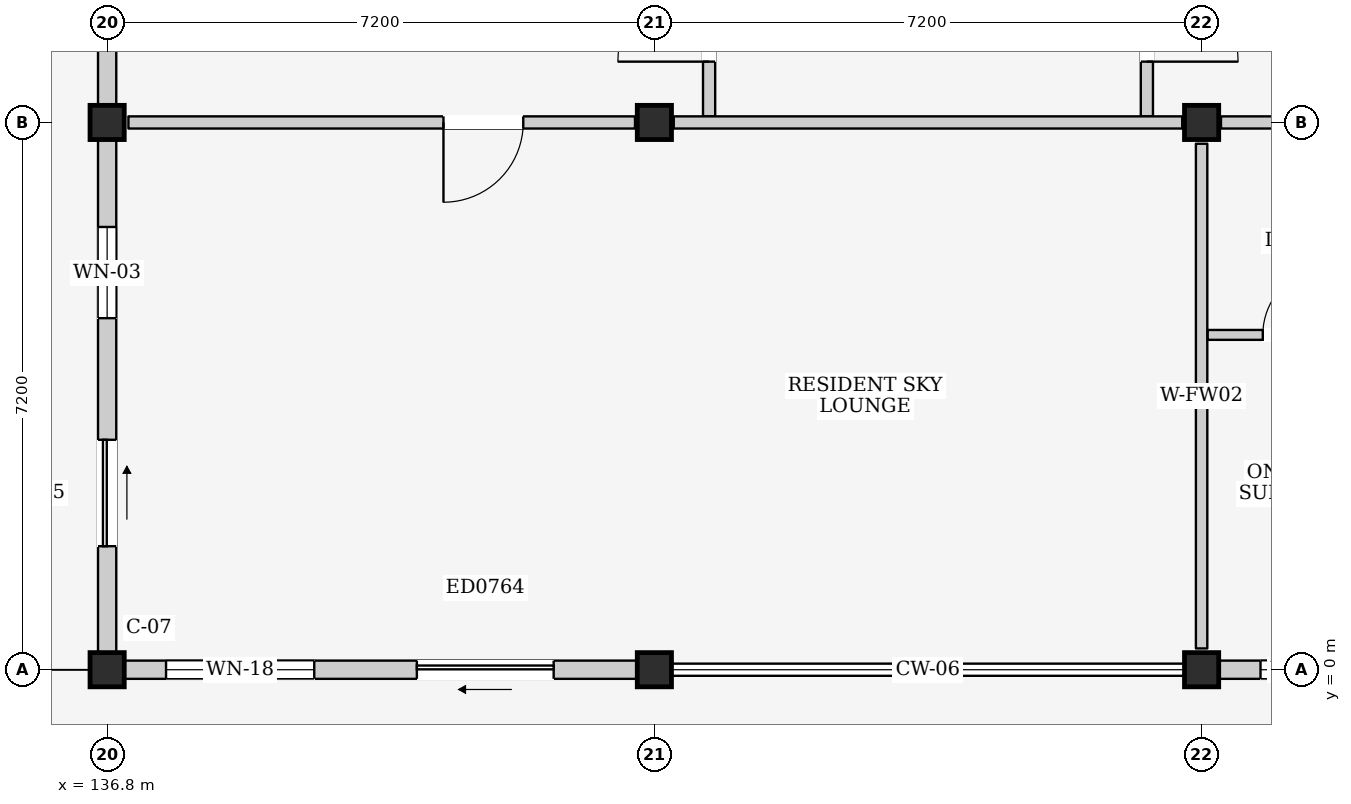
"""IFC4 building model, lengths in metres.
Left out: names, types, materials, properties, quantities, classifications, styles, units other than length and angle.
Written with IfcOpenShell. Run it as: python <this file> out.ifc"""

import sys

from ifc_helpers import new_model, si_unit, direction, frame, frame_2d, origin, origin_2d, place, context, subcontext, project, spatial, rectangle, extrude, element, fill, save


model = new_model("IFC4")
c1 = context("Model", 3, precision=1e-05, world=origin(), true_north=direction((0.0, 1.0)))
c2 = subcontext(c1, "Body", "Model", "MODEL_VIEW")
j1 = project(units=[si_unit("LENGTHUNIT", "METRE"), si_unit("PLANEANGLEUNIT", "RADIAN")], contexts=[c1])
p1 = place(None, origin())
s1 = spatial("IfcSite", under=j1, at=p1, CompositionType="ELEMENT")
p2 = place(p1, origin())
s2 = spatial("IfcBuilding", under=s1, at=p2, CompositionType="ELEMENT")
p3 = place(p2, frame((0.0, 0.0, 34.8)))
s3 = spatial("IfcBuildingStorey", under=s2, at=p3, CompositionType="ELEMENT", Elevation=34.8)
for number, where, z_axis, x_axis in (
    (1, (136.8, 0.0, 0.0), (0.0, 0.0, 1.0), (1.0, 0.0, 0.0)),
    (2, (136.8, 7.2, 0.0), (0.0, 0.0, 1.0), (1.0, 0.0, 0.0)),
    (3, (144.0, 0.0, 0.0), (0.0, 0.0, 1.0), (1.0, 0.0, 0.0)),
    (4, (144.0, 7.2, 0.0), (0.0, 0.0, 1.0), (1.0, 0.0, 0.0)),
    (5, (151.2, 0.0, 0.0), (0.0, 0.0, 1.0), (1.0, 0.0, 0.0)),
    (6, (151.2, 7.2, 0.0), (0.0, 0.0, 1.0), (1.0, 0.0, 0.0)),
):
    element("IfcColumn", number, at=place(p3, frame(where, z_axis=z_axis, x_axis=x_axis)), inside=s3, PredefinedType="COLUMN", context=c2, shape_type="SweptSolid", body=[
        extrude(rectangle(XDim=0.45, YDim=0.45, at=origin_2d()), origin(), (0.0, 0.0, 1.0), 3.2),
    ])
p4 = place(p3, frame((137.025, 0.0, 0.0), z_axis=(0.0, 0.0, 1.0), x_axis=(1.0, 0.0, 0.0)))
e7 = element("IfcWall", 7, at=p4, inside=s3, PredefinedType="ELEMENTEDWALL", context=c2, shape_type="SweptSolid", body=[
    extrude(rectangle(XDim=6.75, YDim=0.24, at=frame_2d((3.375, 0.0))), origin(), (0.0, 0.0, 1.0), 2.495),
])
p5 = place(p4, frame((3.85, 0.0, 0.0)))
e8 = element("IfcOpeningElement", 8, at=p5, cuts=e7, PredefinedType="OPENING", context=c2, shape_type="SweptSolid", body=[
    extrude(rectangle(XDim=1.8, YDim=2.12, at=frame_2d((0.9, 1.06))), frame((0.0, 0.135, 0.0), z_axis=(0.0, -1.0, 0.0), x_axis=(1.0, 0.0, 0.0)), (0.0, 0.0, 1.0), 0.27),
])
p6 = place(p4, frame((0.55, 0.0, 0.835)))
e9 = element("IfcOpeningElement", 9, at=p6, cuts=e7, PredefinedType="OPENING", context=c2, shape_type="SweptSolid", body=[
    extrude(rectangle(XDim=1.95, YDim=1.55, at=frame_2d((0.975, 0.775))), frame((0.0, 0.135, 0.0), z_axis=(0.0, -1.0, 0.0), x_axis=(1.0, 0.0, 0.0)), (0.0, 0.0, 1.0), 0.27),
])
p7 = place(p3, frame((136.8, 0.225, 0.0), z_axis=(0.0, 0.0, 1.0), x_axis=(0.0, 1.0, 0.0)))
e10 = element("IfcWall", 10, at=p7, inside=s3, PredefinedType="ELEMENTEDWALL", context=c2, shape_type="SweptSolid", body=[
    extrude(rectangle(XDim=6.75, YDim=0.24, at=frame_2d((3.375, 0.0))), origin(), (0.0, 0.0, 1.0), 2.445),
])
p8 = place(p7, frame((1.4, 0.0, 0.0)))
e11 = element("IfcOpeningElement", 11, at=p8, cuts=e10, PredefinedType="OPENING", context=c2, shape_type="SweptSolid", body=[
    extrude(rectangle(XDim=1.4, YDim=2.1, at=frame_2d((0.7, 1.05))), frame((0.0, 0.135, 0.0), z_axis=(0.0, -1.0, 0.0), x_axis=(1.0, 0.0, 0.0)), (0.0, 0.0, 1.0), 0.27),
])
p9 = place(p7, frame((4.4, 0.0, 0.95)))
e12 = element("IfcOpeningElement", 12, at=p9, cuts=e10, PredefinedType="OPENING", context=c2, shape_type="SweptSolid", body=[
    extrude(rectangle(XDim=1.2, YDim=1.35, at=frame_2d((0.6, 0.675))), frame((0.0, 0.135, 0.0), z_axis=(0.0, -1.0, 0.0), x_axis=(1.0, 0.0, 0.0)), (0.0, 0.0, 1.0), 0.27),
])
p10 = place(p3, frame((136.8, 7.425, 0.0), z_axis=(0.0, 0.0, 1.0), x_axis=(0.0, 1.0, 0.0)))
e13 = element("IfcWall", 13, at=p10, inside=s3, PredefinedType="ELEMENTEDWALL", context=c2, shape_type="SweptSolid", body=[
    extrude(rectangle(XDim=6.75, YDim=0.24, at=frame_2d((3.375, 0.0))), origin(), (0.0, 0.0, 1.0), 2.445),
])
p11 = place(p10, frame((4.3, 0.0, 1.2)))
e14 = element("IfcOpeningElement", 14, at=p11, cuts=e13, PredefinedType="OPENING", context=c2, shape_type="SweptSolid", body=[
    extrude(rectangle(XDim=1.0, YDim=0.9, at=frame_2d((0.5, 0.45))), frame((0.0, 0.135, 0.0), z_axis=(0.0, -1.0, 0.0), x_axis=(1.0, 0.0, 0.0)), (0.0, 0.0, 1.0), 0.27),
])
p12 = place(p3, frame((151.425, 0.0, 0.0), z_axis=(0.0, 0.0, 1.0), x_axis=(1.0, 0.0, 0.0)))
e15 = element("IfcWall", 15, at=p12, inside=s3, PredefinedType="ELEMENTEDWALL", context=c2, shape_type="SweptSolid", body=[
    extrude(rectangle(XDim=6.75, YDim=0.24, at=frame_2d((3.375, 0.0))), origin(), (0.0, 0.0, 1.0), 2.495),
])
p13 = place(p12, frame((3.85, 0.0, 0.0)))
e16 = element("IfcOpeningElement", 16, at=p13, cuts=e15, PredefinedType="OPENING", context=c2, shape_type="SweptSolid", body=[
    extrude(rectangle(XDim=1.5, YDim=2.12, at=frame_2d((0.75, 1.06))), frame((0.0, 0.135, 0.0), z_axis=(0.0, -1.0, 0.0), x_axis=(1.0, 0.0, 0.0)), (0.0, 0.0, 1.0), 0.27),
])
p14 = place(p12, frame((0.55, 0.0, 0.9)))
e17 = element("IfcOpeningElement", 17, at=p14, cuts=e15, PredefinedType="OPENING", context=c2, shape_type="SweptSolid", body=[
    extrude(rectangle(XDim=1.15, YDim=1.15, at=frame_2d((0.575, 0.575))), frame((0.0, 0.135, 0.0), z_axis=(0.0, -1.0, 0.0), x_axis=(1.0, 0.0, 0.0)), (0.0, 0.0, 1.0), 0.27),
])
p15 = place(p3, frame((144.72, 7.28, 0.0), z_axis=(0.0, 0.0, 1.0), x_axis=(0.0, 1.0, 0.0)))
e18 = element("IfcWall", 18, at=p15, inside=s3, PredefinedType="PARTITIONING", context=c2, shape_type="SweptSolid", body=[
    extrude(rectangle(XDim=4.32, YDim=0.16, at=frame_2d((2.16, 0.0))), origin(), (0.0, 0.0, 1.0), 2.96),
])
p16 = place(p15, frame((0.72, 0.0, 0.0)))
e19 = element("IfcOpeningElement", 19, at=p16, cuts=e18, PredefinedType="OPENING", context=c2, shape_type="SweptSolid", body=[
    extrude(rectangle(XDim=1.2, YDim=2.2, at=frame_2d((0.6, 1.1))), frame((0.0, 0.095, 0.0), z_axis=(0.0, -1.0, 0.0), x_axis=(1.0, 0.0, 0.0)), (0.0, 0.0, 1.0), 0.19),
])
p17 = place(p3, frame((150.48, 7.28, 0.0), z_axis=(0.0, 0.0, 1.0), x_axis=(0.0, 1.0, 0.0)))
e20 = element("IfcWall", 20, at=p17, inside=s3, PredefinedType="PARTITIONING", context=c2, shape_type="SweptSolid", body=[
    extrude(rectangle(XDim=4.32, YDim=0.16, at=frame_2d((2.16, 0.0))), origin(), (0.0, 0.0, 1.0), 2.96),
])
p18 = place(p17, frame((0.72, 0.0, 0.0)))
e21 = element("IfcOpeningElement", 21, at=p18, cuts=e20, PredefinedType="OPENING", context=c2, shape_type="SweptSolid", body=[
    extrude(rectangle(XDim=1.2, YDim=2.2, at=frame_2d((0.6, 1.1))), frame((0.0, 0.095, 0.0), z_axis=(0.0, -1.0, 0.0), x_axis=(1.0, 0.0, 0.0)), (0.0, 0.0, 1.0), 0.19),
])
p19 = place(p3, frame((137.08, 7.2, 0.0), z_axis=(0.0, 0.0, 1.0), x_axis=(1.0, 0.0, 0.0)))
e22 = element("IfcWall", 22, at=p19, inside=s3, PredefinedType="PARTITIONING", context=c2, shape_type="SweptSolid", body=[
    extrude(rectangle(XDim=6.665, YDim=0.16, at=frame_2d((3.333, 0.0))), origin(), (0.0, 0.0, 1.0), 2.345),
])
p20 = place(p19, frame((4.145, 0.0, 0.0)))
e23 = element("IfcOpeningElement", 23, at=p20, cuts=e22, PredefinedType="OPENING", context=c2, shape_type="SweptSolid", body=[
    extrude(rectangle(XDim=1.05, YDim=2.2, at=frame_2d((0.525, 1.1))), frame((0.0, 0.095, 0.0), z_axis=(0.0, -1.0, 0.0), x_axis=(1.0, 0.0, 0.0)), (0.0, 0.0, 1.0), 0.19),
])
p21 = place(p3, frame((144.255, 7.2, 0.0), z_axis=(0.0, 0.0, 1.0), x_axis=(1.0, 0.0, 0.0)))
e24 = element("IfcWall", 24, at=p21, inside=s3, PredefinedType="PARTITIONING", context=c2, shape_type="SweptSolid", body=[
    extrude(rectangle(XDim=6.69, YDim=0.16, at=frame_2d((3.345, 0.0))), origin(), (0.0, 0.0, 1.0), 2.345),
])
p22 = place(p3, frame((151.2, 0.28, 0.0), z_axis=(0.0, 0.0, 1.0), x_axis=(0.0, 1.0, 0.0)))
e25 = element("IfcWall", 25, at=p22, inside=s3, PredefinedType="PARTITIONING", context=c2, shape_type="SweptSolid", body=[
    extrude(rectangle(XDim=6.64, YDim=0.15, at=frame_2d((3.32, 0.0))), origin(), (0.0, 0.0, 1.0), 2.445),
])
p23 = place(p3, frame((151.455, 7.2, 0.0), z_axis=(0.0, 0.0, 1.0), x_axis=(1.0, 0.0, 0.0)))
e26 = element("IfcWall", 26, at=p23, inside=s3, PredefinedType="PARTITIONING", context=c2, shape_type="SweptSolid", body=[
    extrude(rectangle(XDim=6.69, YDim=0.16, at=frame_2d((3.345, 0.0))), origin(), (0.0, 0.0, 1.0), 2.345),
])
p24 = place(p23, frame((4.895, 0.0, 0.0)))
e27 = element("IfcOpeningElement", 27, at=p24, cuts=e26, PredefinedType="OPENING", context=c2, shape_type="SweptSolid", body=[
    extrude(rectangle(XDim=1.0, YDim=2.15, at=frame_2d((0.5, 1.075))), frame((0.0, 0.095, 0.0), z_axis=(0.0, -1.0, 0.0), x_axis=(1.0, 0.0, 0.0)), (0.0, 0.0, 1.0), 0.19),
])
p25 = place(p3, frame((151.28, 4.405, 0.0), z_axis=(0.0, 0.0, 1.0), x_axis=(1.0, 0.0, 0.0)))
e28 = element("IfcWall", 28, at=p25, inside=s3, PredefinedType="PARTITIONING", context=c2, shape_type="SweptSolid", body=[
    extrude(rectangle(XDim=2.35, YDim=0.13, at=frame_2d((1.175, 0.0))), origin(), (0.0, 0.0, 1.0), 2.96),
])
p26 = place(p25, frame((0.725, 0.0, 0.0)))
e29 = element("IfcOpeningElement", 29, at=p26, cuts=e28, PredefinedType="OPENING", context=c2, shape_type="SweptSolid", body=[
    extrude(rectangle(XDim=0.9, YDim=2.1, at=frame_2d((0.45, 1.05))), frame((0.0, 0.08, 0.0), z_axis=(0.0, -1.0, 0.0), x_axis=(1.0, 0.0, 0.0)), (0.0, 0.0, 1.0), 0.16),
])
p27 = place(p5, frame((1.8, 0.0, 0.0), z_axis=(0.0, 0.0, 1.0), x_axis=(-1.0, 0.0, 0.0)))
e30 = element("IfcDoor", 30, at=p27, inside=s3, OperationType="SLIDING_TO_LEFT", PredefinedType="DOOR", context=c2, shape_type="SweptSolid", body=[
    extrude(rectangle(XDim=1.8, YDim=2.12, at=frame_2d((0.9, 1.06))), frame((0.0, 0.025, 0.0), z_axis=(0.0, -1.0, 0.0), x_axis=(1.0, 0.0, 0.0)), (0.0, 0.0, 1.0), 0.05),
])
fill(e8, e30)
p28 = place(p6, origin())
e31 = element("IfcWindow", 31, at=p28, inside=s3, PartitioningType="DOUBLE_PANEL_VERTICAL", PredefinedType="WINDOW", context=c2, shape_type="SweptSolid", body=[
    extrude(rectangle(XDim=1.95, YDim=1.55, at=frame_2d((0.975, 0.775))), frame((0.0, 0.03, 0.0), z_axis=(0.0, -1.0, 0.0), x_axis=(1.0, 0.0, 0.0)), (0.0, 0.0, 1.0), 0.06),
])
fill(e9, e31)
p29 = place(p8, frame((1.4, 0.0, 0.0), z_axis=(0.0, 0.0, 1.0), x_axis=(-1.0, 0.0, 0.0)))
e32 = element("IfcDoor", 32, at=p29, inside=s3, OperationType="SLIDING_TO_RIGHT", PredefinedType="DOOR", context=c2, shape_type="SweptSolid", body=[
    extrude(rectangle(XDim=1.4, YDim=2.1, at=frame_2d((0.7, 1.05))), frame((0.0, 0.025, 0.0), z_axis=(0.0, -1.0, 0.0), x_axis=(1.0, 0.0, 0.0)), (0.0, 0.0, 1.0), 0.05),
])
fill(e11, e32)
p30 = place(p9, origin())
e33 = element("IfcWindow", 33, at=p30, inside=s3, PartitioningType="SINGLE_PANEL", PredefinedType="WINDOW", context=c2, shape_type="SweptSolid", body=[
    extrude(rectangle(XDim=1.2, YDim=1.35, at=frame_2d((0.6, 0.675))), frame((0.0, 0.03, 0.0), z_axis=(0.0, -1.0, 0.0), x_axis=(1.0, 0.0, 0.0)), (0.0, 0.0, 1.0), 0.06),
])
fill(e12, e33)
p31 = place(p14, origin())
e34 = element("IfcWindow", 34, at=p31, inside=s3, PartitioningType="SINGLE_PANEL", PredefinedType="WINDOW", context=c2, shape_type="SweptSolid", body=[
    extrude(rectangle(XDim=1.15, YDim=1.15, at=frame_2d((0.575, 0.575))), frame((0.0, 0.03, 0.0), z_axis=(0.0, -1.0, 0.0), x_axis=(1.0, 0.0, 0.0)), (0.0, 0.0, 1.0), 0.06),
])
fill(e17, e34)
p32 = place(p16, origin())
e35 = element("IfcDoor", 35, at=p32, inside=s3, OperationType="SINGLE_SWING_LEFT", PredefinedType="DOOR", context=c2, shape_type="SweptSolid", body=[
    extrude(rectangle(XDim=1.2, YDim=2.2, at=frame_2d((0.6, 1.1))), frame((0.0, 0.025, 0.0), z_axis=(0.0, -1.0, 0.0), x_axis=(1.0, 0.0, 0.0)), (0.0, 0.0, 1.0), 0.05),
])
fill(e19, e35)
p33 = place(p18, frame((1.2, 0.0, 0.0), z_axis=(0.0, 0.0, 1.0), x_axis=(-1.0, 0.0, 0.0)))
e36 = element("IfcDoor", 36, at=p33, inside=s3, OperationType="SINGLE_SWING_RIGHT", PredefinedType="DOOR", context=c2, shape_type="SweptSolid", body=[
    extrude(rectangle(XDim=1.2, YDim=2.2, at=frame_2d((0.6, 1.1))), frame((0.0, 0.025, 0.0), z_axis=(0.0, -1.0, 0.0), x_axis=(1.0, 0.0, 0.0)), (0.0, 0.0, 1.0), 0.05),
])
fill(e21, e36)
p34 = place(p20, frame((1.05, 0.0, 0.0), z_axis=(0.0, 0.0, 1.0), x_axis=(-1.0, 0.0, 0.0)))
e37 = element("IfcDoor", 37, at=p34, inside=s3, OperationType="SINGLE_SWING_RIGHT", PredefinedType="DOOR", context=c2, shape_type="SweptSolid", body=[
    extrude(rectangle(XDim=1.05, YDim=2.2, at=frame_2d((0.525, 1.1))), frame((0.0, 0.025, 0.0), z_axis=(0.0, -1.0, 0.0), x_axis=(1.0, 0.0, 0.0)), (0.0, 0.0, 1.0), 0.05),
])
fill(e23, e37)
p35 = place(p26, origin())
e38 = element("IfcDoor", 38, at=p35, inside=s3, OperationType="SINGLE_SWING_RIGHT", PredefinedType="DOOR", context=c2, shape_type="SweptSolid", body=[
    extrude(rectangle(XDim=0.9, YDim=2.1, at=frame_2d((0.45, 1.05))), frame((0.0, 0.025, 0.0), z_axis=(0.0, -1.0, 0.0), x_axis=(1.0, 0.0, 0.0)), (0.0, 0.0, 1.0), 0.05),
])
fill(e29, e38)
save(model, sys.argv[1])
